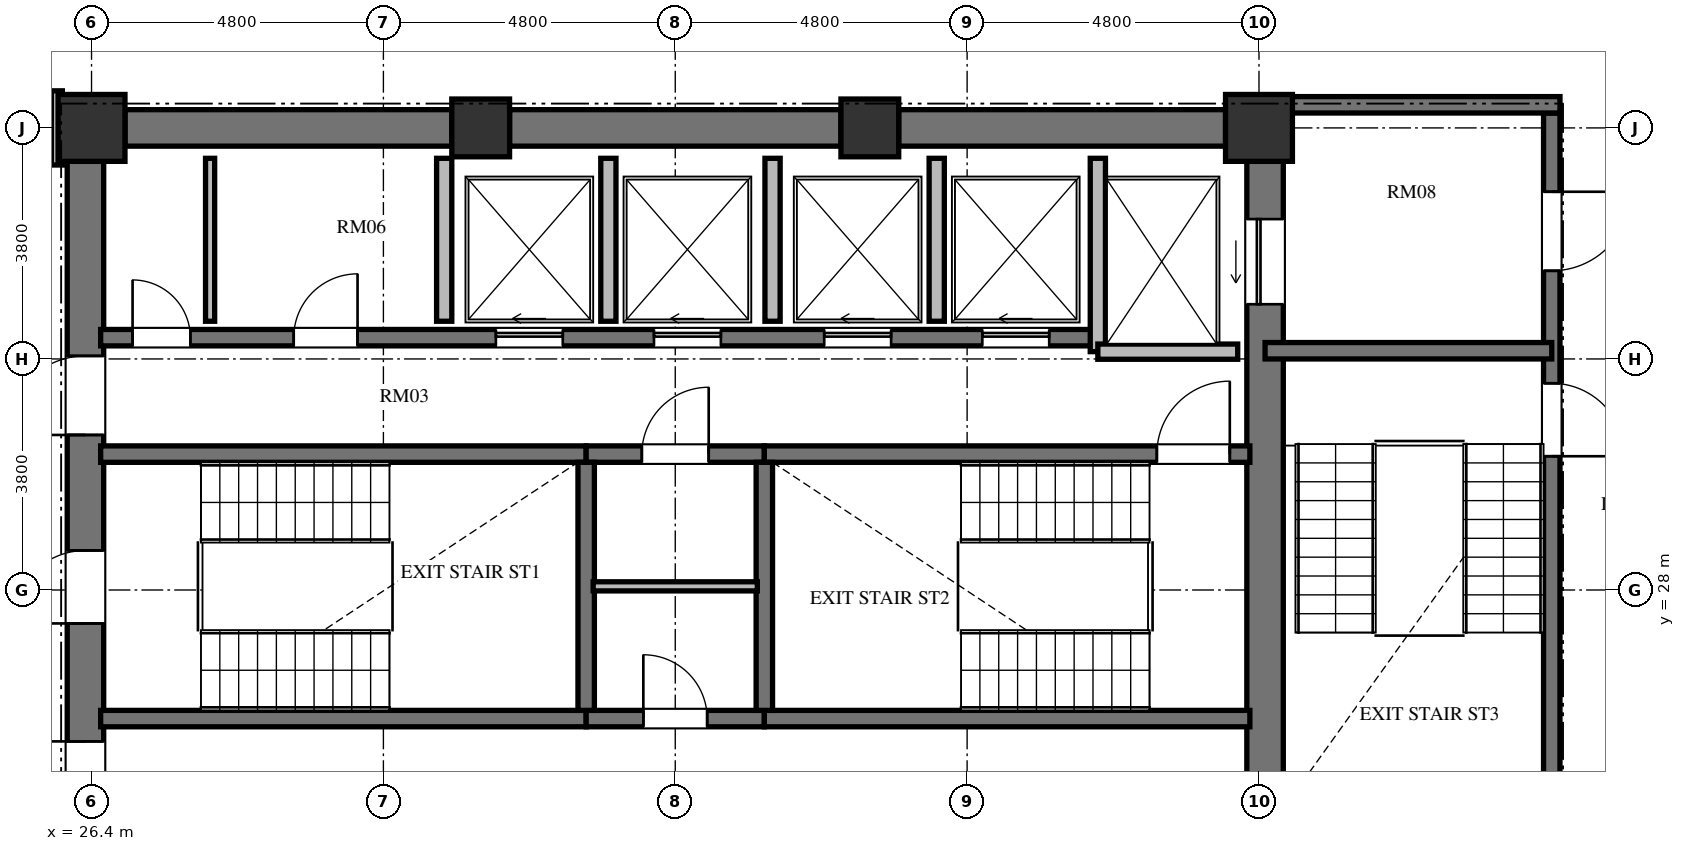
"""IFC4 building model, lengths in metres.
Left out: names, types, materials, properties, quantities, classifications, styles, units other than length and angle.
Written with IfcOpenShell. Run it as: python <this file> out.ifc"""

import sys

from ifc_helpers import new_model, si_unit, direction, frame, frame_2d, origin, origin_2d, place, context, subcontext, project, spatial, rectangle, extrude, element, fill, save


model = new_model("IFC4")
c1 = context("Model", 3, precision=1e-05, world=origin(), true_north=direction((0.0, 1.0)))
c2 = subcontext(c1, "Body", "Model", "MODEL_VIEW")
j1 = project(units=[si_unit("LENGTHUNIT", "METRE"), si_unit("PLANEANGLEUNIT", "RADIAN")], contexts=[c1])
p1 = place(None, origin())
s1 = spatial("IfcSite", under=j1, at=p1, CompositionType="ELEMENT")
p2 = place(p1, origin())
s2 = spatial("IfcBuilding", under=s1, at=p2, CompositionType="ELEMENT")
p3 = place(p2, frame((0.0, 0.0, 174.768)))
s3 = spatial("IfcBuildingStorey", under=s2, at=p3, CompositionType="ELEMENT", Elevation=174.768)
p4 = place(p3, frame((45.6, 35.6, 0.0), z_axis=(0.0, 0.0, 1.0), x_axis=(1.0, 0.0, 0.0)))
e1 = element("IfcColumn", 1, at=p4, inside=s3, PredefinedType="COLUMN", context=c2, shape_type="SweptSolid", body=[
    extrude(rectangle(XDim=1.1, YDim=1.1, at=origin_2d()), origin(), (0.0, 0.0, 1.0), 3.648),
])
for number, where, z_axis, x_axis in (
    (2, (39.2, 35.6, 0.0), (0.0, 0.0, 1.0), (1.0, 0.0, 0.0)),
    (3, (32.8, 35.6, 0.0), (0.0, 0.0, 1.0), (1.0, 0.0, 0.0)),
):
    element("IfcColumn", number, at=place(p3, frame(where, z_axis=z_axis, x_axis=x_axis)), inside=s3, PredefinedType="COLUMN", context=c2, shape_type="SweptSolid", body=[
        extrude(rectangle(XDim=0.95, YDim=0.95, at=origin_2d()), origin(), (0.0, 0.0, 1.0), 3.648),
    ])
p5 = place(p3, frame((26.4, 35.6, 0.0), z_axis=(0.0, 0.0, 1.0), x_axis=(1.0, 0.0, 0.0)))
e4 = element("IfcColumn", 4, at=p5, inside=s3, PredefinedType="COLUMN", context=c2, shape_type="SweptSolid", body=[
    extrude(rectangle(XDim=1.1, YDim=1.1, at=origin_2d()), origin(), (0.0, 0.0, 1.0), 3.648),
])
p6 = place(p3, frame((26.3, 20.95, 0.0), z_axis=(0.0, 0.0, 1.0), x_axis=(0.0, 1.0, 0.0)))
e5 = element("IfcWall", 5, at=p6, inside=s3, PredefinedType="SHEAR", context=c2, shape_type="SweptSolid", body=[
    extrude(rectangle(XDim=14.1, YDim=0.6, at=frame_2d((7.05, 0.0))), origin(), (0.0, 0.0, 1.0), 3.648),
])
p7 = place(p6, frame((6.5, 0.0, 0.0)))
e6 = element("IfcOpeningElement", 6, at=p7, cuts=e5, PredefinedType="OPENING", context=c2, shape_type="SweptSolid", body=[
    extrude(rectangle(XDim=1.2, YDim=2.15, at=frame_2d((0.6, 1.075))), frame((0.0, 0.31, 0.0), z_axis=(0.0, -1.0, 0.0), x_axis=(1.0, 0.0, 0.0)), (0.0, 0.0, 1.0), 0.62),
])
p8 = place(p6, frame((9.6, 0.0, 0.0)))
e7 = element("IfcOpeningElement", 7, at=p8, cuts=e5, PredefinedType="OPENING", context=c2, shape_type="SweptSolid", body=[
    extrude(rectangle(XDim=1.3, YDim=2.2, at=frame_2d((0.65, 1.1))), frame((0.0, 0.31, 0.0), z_axis=(0.0, -1.0, 0.0), x_axis=(1.0, 0.0, 0.0)), (0.0, 0.0, 1.0), 0.62),
])
p9 = place(p6, frame((3.26, 0.0, 0.0)))
e8 = element("IfcOpeningElement", 8, at=p9, cuts=e5, PredefinedType="OPENING", context=c2, shape_type="SweptSolid", body=[
    extrude(rectangle(XDim=1.3, YDim=2.2, at=frame_2d((0.65, 1.1))), frame((0.0, 0.31, 0.0), z_axis=(0.0, -1.0, 0.0), x_axis=(1.0, 0.0, 0.0)), (0.0, 0.0, 1.0), 0.62),
])
p10 = place(p3, frame((45.7, 20.95, 0.0), z_axis=(0.0, 0.0, 1.0), x_axis=(0.0, 1.0, 0.0)))
e9 = element("IfcWall", 9, at=p10, inside=s3, PredefinedType="SHEAR", context=c2, shape_type="SweptSolid", body=[
    extrude(rectangle(XDim=14.1, YDim=0.6, at=frame_2d((7.05, 0.0))), origin(), (0.0, 0.0, 1.0), 3.648),
])
p11 = place(p10, frame((11.75, 0.0, 0.0)))
e10 = element("IfcOpeningElement", 10, at=p11, cuts=e9, PredefinedType="OPENING", context=c2, shape_type="SweptSolid", body=[
    extrude(rectangle(XDim=1.4, YDim=2.3, at=frame_2d((0.7, 1.15))), frame((0.0, 0.31, 0.0), z_axis=(0.0, -1.0, 0.0), x_axis=(1.0, 0.0, 0.0)), (0.0, 0.0, 1.0), 0.62),
])
p12 = place(p10, frame((0.95, 0.0, 0.0)))
e11 = element("IfcOpeningElement", 11, at=p12, cuts=e9, PredefinedType="OPENING", context=c2, shape_type="SweptSolid", body=[
    extrude(rectangle(XDim=1.4, YDim=2.3, at=frame_2d((0.7, 1.15))), frame((0.0, 0.31, 0.0), z_axis=(0.0, -1.0, 0.0), x_axis=(1.0, 0.0, 0.0)), (0.0, 0.0, 1.0), 0.62),
])
p13 = place(p3, frame((26.95, 35.6, 0.0), z_axis=(0.0, 0.0, 1.0), x_axis=(1.0, 0.0, 0.0)))
e12 = element("IfcWall", 12, at=p13, inside=s3, PredefinedType="SHEAR", context=c2, shape_type="SweptSolid", body=[
    extrude(rectangle(XDim=5.375, YDim=0.6, at=frame_2d((2.688, 0.0))), origin(), (0.0, 0.0, 1.0), 3.648),
])
p14 = place(p3, frame((33.275, 35.6, 0.0), z_axis=(0.0, 0.0, 1.0), x_axis=(1.0, 0.0, 0.0)))
e13 = element("IfcWall", 13, at=p14, inside=s3, PredefinedType="SHEAR", context=c2, shape_type="SweptSolid", body=[
    extrude(rectangle(XDim=5.45, YDim=0.6, at=frame_2d((2.725, 0.0))), origin(), (0.0, 0.0, 1.0), 3.648),
])
p15 = place(p3, frame((39.675, 35.6, 0.0), z_axis=(0.0, 0.0, 1.0), x_axis=(1.0, 0.0, 0.0)))
e14 = element("IfcWall", 14, at=p15, inside=s3, PredefinedType="SHEAR", context=c2, shape_type="SweptSolid", body=[
    extrude(rectangle(XDim=5.375, YDim=0.6, at=frame_2d((2.688, 0.0))), origin(), (0.0, 0.0, 1.0), 3.648),
])
p16 = place(p3, frame((26.55, 30.235, 0.0), z_axis=(0.0, 0.0, 1.0), x_axis=(1.0, 0.0, 0.0)))
e15 = element("IfcWall", 15, at=p16, inside=s3, PredefinedType="SHEAR", context=c2, shape_type="SweptSolid", body=[
    extrude(rectangle(XDim=7.985, YDim=0.27, at=frame_2d((3.992, 0.0))), origin(), (0.0, 0.0, 1.0), 3.648),
])
p17 = place(p3, frame((34.535, 30.235, 0.0), z_axis=(0.0, 0.0, 1.0), x_axis=(1.0, 0.0, 0.0)))
e16 = element("IfcWall", 16, at=p17, inside=s3, PredefinedType="SHEAR", context=c2, shape_type="SweptSolid", body=[
    extrude(rectangle(XDim=2.93, YDim=0.27, at=frame_2d((1.465, 0.0))), origin(), (0.0, 0.0, 1.0), 3.648),
])
p18 = place(p17, frame((0.915, 0.0, 0.0)))
e17 = element("IfcOpeningElement", 17, at=p18, cuts=e16, PredefinedType="OPENING", context=c2, shape_type="SweptSolid", body=[
    extrude(rectangle(XDim=1.1, YDim=2.15, at=frame_2d((0.55, 1.075))), frame((0.0, 0.145, 0.0), z_axis=(0.0, -1.0, 0.0), x_axis=(1.0, 0.0, 0.0)), (0.0, 0.0, 1.0), 0.29),
])
p19 = place(p3, frame((37.465, 30.235, 0.0), z_axis=(0.0, 0.0, 1.0), x_axis=(1.0, 0.0, 0.0)))
e18 = element("IfcWall", 18, at=p19, inside=s3, PredefinedType="SHEAR", context=c2, shape_type="SweptSolid", body=[
    extrude(rectangle(XDim=7.985, YDim=0.27, at=frame_2d((3.992, 0.0))), origin(), (0.0, 0.0, 1.0), 3.648),
])
p20 = place(p19, frame((6.455, 0.0, 0.0)))
e19 = element("IfcOpeningElement", 19, at=p20, cuts=e18, PredefinedType="OPENING", context=c2, shape_type="SweptSolid", body=[
    extrude(rectangle(XDim=1.2, YDim=2.15, at=frame_2d((0.6, 1.075))), frame((0.0, 0.145, 0.0), z_axis=(0.0, -1.0, 0.0), x_axis=(1.0, 0.0, 0.0)), (0.0, 0.0, 1.0), 0.29),
])
p21 = place(p3, frame((26.55, 25.885, 0.0), z_axis=(0.0, 0.0, 1.0), x_axis=(1.0, 0.0, 0.0)))
e20 = element("IfcWall", 20, at=p21, inside=s3, PredefinedType="SHEAR", context=c2, shape_type="SweptSolid", body=[
    extrude(rectangle(XDim=7.985, YDim=0.27, at=frame_2d((3.992, 0.0))), origin(), (0.0, 0.0, 1.0), 3.648),
])
p22 = place(p3, frame((34.535, 25.885, 0.0), z_axis=(0.0, 0.0, 1.0), x_axis=(1.0, 0.0, 0.0)))
e21 = element("IfcWall", 21, at=p22, inside=s3, PredefinedType="SHEAR", context=c2, shape_type="SweptSolid", body=[
    extrude(rectangle(XDim=2.93, YDim=0.27, at=frame_2d((1.465, 0.0))), origin(), (0.0, 0.0, 1.0), 3.648),
])
p23 = place(p22, frame((0.94, 0.0, 0.0)))
e22 = element("IfcOpeningElement", 22, at=p23, cuts=e21, PredefinedType="OPENING", context=c2, shape_type="SweptSolid", body=[
    extrude(rectangle(XDim=1.05, YDim=2.15, at=frame_2d((0.525, 1.075))), frame((0.0, 0.145, 0.0), z_axis=(0.0, -1.0, 0.0), x_axis=(1.0, 0.0, 0.0)), (0.0, 0.0, 1.0), 0.29),
])
p24 = place(p3, frame((37.465, 25.885, 0.0), z_axis=(0.0, 0.0, 1.0), x_axis=(1.0, 0.0, 0.0)))
e23 = element("IfcWall", 23, at=p24, inside=s3, PredefinedType="SHEAR", context=c2, shape_type="SweptSolid", body=[
    extrude(rectangle(XDim=7.985, YDim=0.27, at=frame_2d((3.992, 0.0))), origin(), (0.0, 0.0, 1.0), 3.648),
])
for number, where, z_axis, x_axis in (
    (24, (34.535, 26.02, 0.0), (0.0, 0.0, 1.0), (0.0, 1.0, 0.0)),
    (25, (37.465, 26.02, 0.0), (0.0, 0.0, 1.0), (0.0, 1.0, 0.0)),
):
    element("IfcWall", number, at=place(p3, frame(where, z_axis=z_axis, x_axis=x_axis)), inside=s3, PredefinedType="SHEAR", context=c2, shape_type="SweptSolid", body=[
        extrude(rectangle(XDim=4.08, YDim=0.27, at=frame_2d((2.04, 0.0))), origin(), (0.0, 0.0, 1.0), 3.648),
    ])
p25 = place(p3, frame((34.65, 28.06, 0.0), z_axis=(0.0, 0.0, 1.0), x_axis=(1.0, 0.0, 0.0)))
e26 = element("IfcWall", 26, at=p25, inside=s3, PredefinedType="PARTITIONING", context=c2, shape_type="SweptSolid", body=[
    extrude(rectangle(XDim=2.7, YDim=0.15, at=frame_2d((1.35, 0.0))), origin(), (0.0, 0.0, 1.0), 3.428),
])
p26 = place(p3, frame((26.55, 32.15, 0.0), z_axis=(0.0, 0.0, 1.0), x_axis=(1.0, 0.0, 0.0)))
e27 = element("IfcWall", 27, at=p26, inside=s3, PredefinedType="SHEAR", context=c2, shape_type="SweptSolid", body=[
    extrude(rectangle(XDim=16.4, YDim=0.27, at=frame_2d((8.2, 0.0))), origin(), (0.0, 0.0, 1.0), 3.648),
])
p27 = place(p26, frame((0.525, 0.0, 0.0)))
e28 = element("IfcOpeningElement", 28, at=p27, cuts=e27, PredefinedType="OPENING", context=c2, shape_type="SweptSolid", body=[
    extrude(rectangle(XDim=0.95, YDim=2.1, at=frame_2d((0.475, 1.05))), frame((0.0, 0.145, 0.0), z_axis=(0.0, -1.0, 0.0), x_axis=(1.0, 0.0, 0.0)), (0.0, 0.0, 1.0), 0.29),
])
p28 = place(p26, frame((3.175, 0.0, 0.0)))
e29 = element("IfcOpeningElement", 29, at=p28, cuts=e27, PredefinedType="OPENING", context=c2, shape_type="SweptSolid", body=[
    extrude(rectangle(XDim=1.05, YDim=2.15, at=frame_2d((0.525, 1.075))), frame((0.0, 0.145, 0.0), z_axis=(0.0, -1.0, 0.0), x_axis=(1.0, 0.0, 0.0)), (0.0, 0.0, 1.0), 0.29),
])
p29 = place(p26, frame((6.5, 0.0, 0.0)))
e30 = element("IfcOpeningElement", 30, at=p29, cuts=e27, PredefinedType="OPENING", context=c2, shape_type="SweptSolid", body=[
    extrude(rectangle(XDim=1.1, YDim=2.2, at=frame_2d((0.55, 1.1))), frame((0.0, 0.145, 0.0), z_axis=(0.0, -1.0, 0.0), x_axis=(1.0, 0.0, 0.0)), (0.0, 0.0, 1.0), 0.29),
])
p30 = place(p26, frame((9.1, 0.0, 0.0)))
e31 = element("IfcOpeningElement", 31, at=p30, cuts=e27, PredefinedType="OPENING", context=c2, shape_type="SweptSolid", body=[
    extrude(rectangle(XDim=1.1, YDim=2.2, at=frame_2d((0.55, 1.1))), frame((0.0, 0.145, 0.0), z_axis=(0.0, -1.0, 0.0), x_axis=(1.0, 0.0, 0.0)), (0.0, 0.0, 1.0), 0.29),
])
p31 = place(p26, frame((11.9, 0.0, 0.0)))
e32 = element("IfcOpeningElement", 32, at=p31, cuts=e27, PredefinedType="OPENING", context=c2, shape_type="SweptSolid", body=[
    extrude(rectangle(XDim=1.1, YDim=2.2, at=frame_2d((0.55, 1.1))), frame((0.0, 0.145, 0.0), z_axis=(0.0, -1.0, 0.0), x_axis=(1.0, 0.0, 0.0)), (0.0, 0.0, 1.0), 0.29),
])
p32 = place(p26, frame((14.5, 0.0, 0.0)))
e33 = element("IfcOpeningElement", 33, at=p32, cuts=e27, PredefinedType="OPENING", context=c2, shape_type="SweptSolid", body=[
    extrude(rectangle(XDim=1.1, YDim=2.2, at=frame_2d((0.55, 1.1))), frame((0.0, 0.145, 0.0), z_axis=(0.0, -1.0, 0.0), x_axis=(1.0, 0.0, 0.0)), (0.0, 0.0, 1.0), 0.29),
])
p33 = place(p3, frame((42.95, 31.92, 0.0), z_axis=(0.0, 0.0, 1.0), x_axis=(0.0, 1.0, 0.0)))
e34 = element("IfcWall", 34, at=p33, inside=s3, PredefinedType="SOLIDWALL", context=c2, shape_type="SweptSolid", body=[
    extrude(rectangle(XDim=3.18, YDim=0.25, at=frame_2d((1.59, 0.0))), origin(), (0.0, 0.0, 1.0), 3.428),
])
p34 = place(p3, frame((42.95, 31.92, 0.0), z_axis=(0.0, 0.0, 1.0), x_axis=(1.0, 0.0, 0.0)))
e35 = element("IfcWall", 35, at=p34, inside=s3, PredefinedType="SOLIDWALL", context=c2, shape_type="SweptSolid", body=[
    extrude(rectangle(XDim=2.3, YDim=0.25, at=frame_2d((1.15, 0.0))), origin(), (0.0, 0.0, 1.0), 3.428),
])
for number, where, z_axis, x_axis in (
    (36, (32.2, 32.42, 0.0), (0.0, 0.0, 1.0), (0.0, 1.0, 0.0)),
    (37, (34.9, 32.42, 0.0), (0.0, 0.0, 1.0), (0.0, 1.0, 0.0)),
    (38, (37.6, 32.42, 0.0), (0.0, 0.0, 1.0), (0.0, 1.0, 0.0)),
    (39, (40.3, 32.42, 0.0), (0.0, 0.0, 1.0), (0.0, 1.0, 0.0)),
):
    element("IfcWall", number, at=place(p3, frame(where, z_axis=z_axis, x_axis=x_axis)), inside=s3, PredefinedType="SOLIDWALL", context=c2, shape_type="SweptSolid", body=[
        extrude(rectangle(XDim=2.68, YDim=0.25, at=frame_2d((1.34, 0.0))), origin(), (0.0, 0.0, 1.0), 3.428),
    ])
p35 = place(p3, frame((28.35, 32.42, 0.0), z_axis=(0.0, 0.0, 1.0), x_axis=(0.0, 1.0, 0.0)))
e40 = element("IfcWall", 40, at=p35, inside=s3, PredefinedType="PARTITIONING", context=c2, shape_type="SweptSolid", body=[
    extrude(rectangle(XDim=2.68, YDim=0.15, at=frame_2d((1.34, 0.0))), origin(), (0.0, 0.0, 1.0), 3.428),
])
p36 = place(p3, frame((50.415, 35.845, 0.0), z_axis=(0.0, 0.0, 1.0), x_axis=(0.0, -1.0, 0.0)))
e41 = element("IfcWall", 41, at=p36, inside=s3, PredefinedType="SHEAR", context=c2, shape_type="SweptSolid", body=[
    extrude(rectangle(XDim=15.825, YDim=0.27, at=frame_2d((7.913, 0.0))), origin(), (0.0, 0.0, 1.0), 3.648),
])
p37 = place(p36, frame((4.445, 0.0, 0.0)))
e42 = element("IfcOpeningElement", 42, at=p37, cuts=e41, PredefinedType="OPENING", context=c2, shape_type="SweptSolid", body=[
    extrude(rectangle(XDim=1.2, YDim=2.15, at=frame_2d((0.6, 1.075))), frame((0.0, 0.145, 0.0), z_axis=(0.0, -1.0, 0.0), x_axis=(1.0, 0.0, 0.0)), (0.0, 0.0, 1.0), 0.29),
])
p38 = place(p36, frame((1.295, 0.0, 0.0)))
e43 = element("IfcOpeningElement", 43, at=p38, cuts=e41, PredefinedType="OPENING", context=c2, shape_type="SweptSolid", body=[
    extrude(rectangle(XDim=1.3, YDim=2.2, at=frame_2d((0.65, 1.1))), frame((0.0, 0.145, 0.0), z_axis=(0.0, -1.0, 0.0), x_axis=(1.0, 0.0, 0.0)), (0.0, 0.0, 1.0), 0.29),
])
p39 = place(p36, frame((13.095, 0.0, 0.0)))
e44 = element("IfcOpeningElement", 44, at=p39, cuts=e41, PredefinedType="OPENING", context=c2, shape_type="SweptSolid", body=[
    extrude(rectangle(XDim=1.3, YDim=2.2, at=frame_2d((0.65, 1.1))), frame((0.0, 0.145, 0.0), z_axis=(0.0, -1.0, 0.0), x_axis=(1.0, 0.0, 0.0)), (0.0, 0.0, 1.0), 0.29),
])
p40 = place(p3, frame((46.0, 35.98, 0.0), z_axis=(0.0, 0.0, 1.0), x_axis=(1.0, 0.0, 0.0)))
e45 = element("IfcWall", 45, at=p40, inside=s3, PredefinedType="SHEAR", context=c2, shape_type="SweptSolid", body=[
    extrude(rectangle(XDim=4.55, YDim=0.27, at=frame_2d((2.275, 0.0))), origin(), (0.0, 0.0, 1.0), 3.648),
])
p41 = place(p3, frame((45.7, 31.935, 0.0), z_axis=(0.0, 0.0, 1.0), x_axis=(1.0, 0.0, 0.0)))
e46 = element("IfcWall", 46, at=p41, inside=s3, PredefinedType="SHEAR", context=c2, shape_type="SweptSolid", body=[
    extrude(rectangle(XDim=4.715, YDim=0.27, at=frame_2d((2.357, 0.0))), origin(), (0.0, 0.0, 1.0), 3.648),
])
p42 = place(p3, frame((25.83, 36.21, 0.0), z_axis=(0.0, 0.0, 1.0), x_axis=(0.0, -1.0, 0.0)))
e47 = element("IfcWall", 47, at=p42, inside=s3, PredefinedType="PARTITIONING", context=c2, shape_type="SweptSolid", body=[
    extrude(rectangle(XDim=1.22, YDim=0.18, at=frame_2d((0.61, 0.0))), origin(), (0.0, 0.0, 1.0), 3.428),
])
p43 = place(p7, origin())
e48 = element("IfcDoor", 48, at=p43, inside=s3, OperationType="SINGLE_SWING_LEFT", PredefinedType="DOOR", context=c2, shape_type="SweptSolid", body=[
    extrude(rectangle(XDim=1.2, YDim=2.15, at=frame_2d((0.6, 1.075))), frame((0.0, 0.025, 0.0), z_axis=(0.0, -1.0, 0.0), x_axis=(1.0, 0.0, 0.0)), (0.0, 0.0, 1.0), 0.05),
])
fill(e6, e48)
p44 = place(p20, origin())
e49 = element("IfcDoor", 49, at=p44, inside=s3, OperationType="SINGLE_SWING_RIGHT", PredefinedType="DOOR", context=c2, shape_type="SweptSolid", body=[
    extrude(rectangle(XDim=1.2, YDim=2.15, at=frame_2d((0.6, 1.075))), frame((0.0, 0.025, 0.0), z_axis=(0.0, -1.0, 0.0), x_axis=(1.0, 0.0, 0.0)), (0.0, 0.0, 1.0), 0.05),
])
fill(e19, e49)
p45 = place(p23, origin())
e50 = element("IfcDoor", 50, at=p45, inside=s3, OperationType="SINGLE_SWING_LEFT", PredefinedType="DOOR", context=c2, shape_type="SweptSolid", body=[
    extrude(rectangle(XDim=1.05, YDim=2.15, at=frame_2d((0.525, 1.075))), frame((0.0, 0.025, 0.0), z_axis=(0.0, -1.0, 0.0), x_axis=(1.0, 0.0, 0.0)), (0.0, 0.0, 1.0), 0.05),
])
fill(e22, e50)
p46 = place(p18, origin())
e51 = element("IfcDoor", 51, at=p46, inside=s3, OperationType="SINGLE_SWING_RIGHT", PredefinedType="DOOR", context=c2, shape_type="SweptSolid", body=[
    extrude(rectangle(XDim=1.1, YDim=2.15, at=frame_2d((0.55, 1.075))), frame((0.0, 0.025, 0.0), z_axis=(0.0, -1.0, 0.0), x_axis=(1.0, 0.0, 0.0)), (0.0, 0.0, 1.0), 0.05),
])
fill(e17, e51)
p47 = place(p8, origin())
e52 = element("IfcDoor", 52, at=p47, inside=s3, OperationType="SINGLE_SWING_LEFT", PredefinedType="DOOR", context=c2, shape_type="SweptSolid", body=[
    extrude(rectangle(XDim=1.3, YDim=2.2, at=frame_2d((0.65, 1.1))), frame((0.0, 0.025, 0.0), z_axis=(0.0, -1.0, 0.0), x_axis=(1.0, 0.0, 0.0)), (0.0, 0.0, 1.0), 0.05),
])
fill(e7, e52)
p48 = place(p9, origin())
e53 = element("IfcDoor", 53, at=p48, inside=s3, OperationType="SINGLE_SWING_RIGHT", PredefinedType="DOOR", context=c2, shape_type="SweptSolid", body=[
    extrude(rectangle(XDim=1.3, YDim=2.2, at=frame_2d((0.65, 1.1))), frame((0.0, 0.025, 0.0), z_axis=(0.0, -1.0, 0.0), x_axis=(1.0, 0.0, 0.0)), (0.0, 0.0, 1.0), 0.05),
])
fill(e8, e53)
p49 = place(p27, origin())
e54 = element("IfcDoor", 54, at=p49, inside=s3, OperationType="SINGLE_SWING_LEFT", PredefinedType="DOOR", context=c2, shape_type="SweptSolid", body=[
    extrude(rectangle(XDim=0.95, YDim=2.1, at=frame_2d((0.475, 1.05))), frame((0.0, 0.025, 0.0), z_axis=(0.0, -1.0, 0.0), x_axis=(1.0, 0.0, 0.0)), (0.0, 0.0, 1.0), 0.05),
])
fill(e28, e54)
p50 = place(p28, origin())
e55 = element("IfcDoor", 55, at=p50, inside=s3, OperationType="SINGLE_SWING_RIGHT", PredefinedType="DOOR", context=c2, shape_type="SweptSolid", body=[
    extrude(rectangle(XDim=1.05, YDim=2.15, at=frame_2d((0.525, 1.075))), frame((0.0, 0.025, 0.0), z_axis=(0.0, -1.0, 0.0), x_axis=(1.0, 0.0, 0.0)), (0.0, 0.0, 1.0), 0.05),
])
fill(e29, e55)
p51 = place(p29, origin())
e56 = element("IfcDoor", 56, at=p51, inside=s3, OperationType="SLIDING_TO_LEFT", PredefinedType="DOOR", context=c2, shape_type="SweptSolid", body=[
    extrude(rectangle(XDim=1.1, YDim=2.2, at=frame_2d((0.55, 1.1))), frame((0.0, 0.025, 0.0), z_axis=(0.0, -1.0, 0.0), x_axis=(1.0, 0.0, 0.0)), (0.0, 0.0, 1.0), 0.05),
])
fill(e30, e56)
p52 = place(p30, origin())
e57 = element("IfcDoor", 57, at=p52, inside=s3, OperationType="SLIDING_TO_LEFT", PredefinedType="DOOR", context=c2, shape_type="SweptSolid", body=[
    extrude(rectangle(XDim=1.1, YDim=2.2, at=frame_2d((0.55, 1.1))), frame((0.0, 0.025, 0.0), z_axis=(0.0, -1.0, 0.0), x_axis=(1.0, 0.0, 0.0)), (0.0, 0.0, 1.0), 0.05),
])
fill(e31, e57)
p53 = place(p31, origin())
e58 = element("IfcDoor", 58, at=p53, inside=s3, OperationType="SLIDING_TO_LEFT", PredefinedType="DOOR", context=c2, shape_type="SweptSolid", body=[
    extrude(rectangle(XDim=1.1, YDim=2.2, at=frame_2d((0.55, 1.1))), frame((0.0, 0.025, 0.0), z_axis=(0.0, -1.0, 0.0), x_axis=(1.0, 0.0, 0.0)), (0.0, 0.0, 1.0), 0.05),
])
fill(e32, e58)
p54 = place(p32, origin())
e59 = element("IfcDoor", 59, at=p54, inside=s3, OperationType="SLIDING_TO_LEFT", PredefinedType="DOOR", context=c2, shape_type="SweptSolid", body=[
    extrude(rectangle(XDim=1.1, YDim=2.2, at=frame_2d((0.55, 1.1))), frame((0.0, 0.025, 0.0), z_axis=(0.0, -1.0, 0.0), x_axis=(1.0, 0.0, 0.0)), (0.0, 0.0, 1.0), 0.05),
])
fill(e33, e59)
p55 = place(p11, origin())
e60 = element("IfcDoor", 60, at=p55, inside=s3, OperationType="SLIDING_TO_LEFT", PredefinedType="DOOR", context=c2, shape_type="SweptSolid", body=[
    extrude(rectangle(XDim=1.4, YDim=2.3, at=frame_2d((0.7, 1.15))), frame((0.0, 0.025, 0.0), z_axis=(0.0, -1.0, 0.0), x_axis=(1.0, 0.0, 0.0)), (0.0, 0.0, 1.0), 0.05),
])
fill(e10, e60)
p56 = place(p37, origin())
e61 = element("IfcDoor", 61, at=p56, inside=s3, OperationType="SINGLE_SWING_RIGHT", PredefinedType="DOOR", context=c2, shape_type="SweptSolid", body=[
    extrude(rectangle(XDim=1.2, YDim=2.15, at=frame_2d((0.6, 1.075))), frame((0.0, 0.025, 0.0), z_axis=(0.0, -1.0, 0.0), x_axis=(1.0, 0.0, 0.0)), (0.0, 0.0, 1.0), 0.05),
])
fill(e42, e61)
p57 = place(p38, origin())
e62 = element("IfcDoor", 62, at=p57, inside=s3, OperationType="SINGLE_SWING_LEFT", PredefinedType="DOOR", context=c2, shape_type="SweptSolid", body=[
    extrude(rectangle(XDim=1.3, YDim=2.2, at=frame_2d((0.65, 1.1))), frame((0.0, 0.025, 0.0), z_axis=(0.0, -1.0, 0.0), x_axis=(1.0, 0.0, 0.0)), (0.0, 0.0, 1.0), 0.05),
])
fill(e43, e62)
save(model, sys.argv[1])
